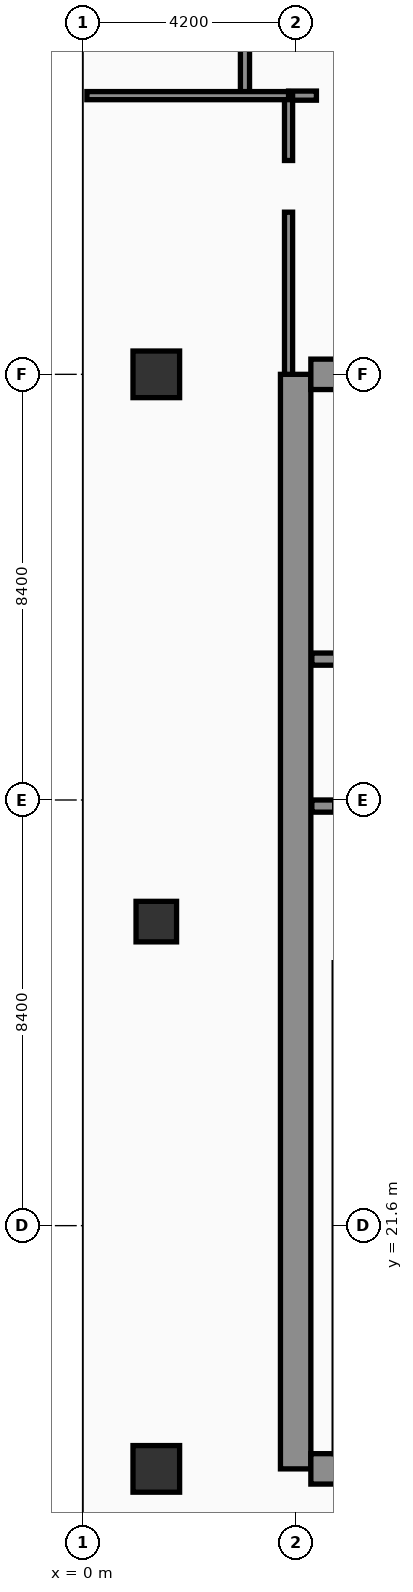
"""IFC4 building model, lengths in metres.
Left out: names, types, materials, properties, quantities, classifications, styles, units other than length and angle.
Written with IfcOpenShell. Run it as: python <this file> out.ifc"""

import sys

from ifc_helpers import new_model, si_unit, direction, frame, frame_2d, origin, origin_2d, place, context, subcontext, project, spatial, rectangle, extrude, element, fill, save


model = new_model("IFC4")
c1 = context("Model", 3, precision=1e-05, world=origin(), true_north=direction((0.0, 1.0)))
c2 = subcontext(c1, "Body", "Model", "MODEL_VIEW")
j1 = project(units=[si_unit("LENGTHUNIT", "METRE"), si_unit("PLANEANGLEUNIT", "RADIAN")], contexts=[c1])
p1 = place(None, origin())
s1 = spatial("IfcSite", under=j1, at=p1, CompositionType="ELEMENT")
p2 = place(p1, origin())
s2 = spatial("IfcBuilding", under=s1, at=p2, CompositionType="ELEMENT")
p3 = place(p2, frame((0.0, 0.0, 316.0)))
s3 = spatial("IfcBuildingStorey", under=s2, at=p3, CompositionType="ELEMENT", Elevation=316.0)
p4 = place(p3, frame((4.2, 16.8, 0.0), z_axis=(0.0, 0.0, 1.0), x_axis=(0.0, 1.0, 0.0)))
e1 = element("IfcWall", 1, at=p4, inside=s3, PredefinedType="SHEAR", context=c2, shape_type="SweptSolid", body=[
    extrude(rectangle(XDim=21.6, YDim=0.6, at=frame_2d((10.8, 0.0))), origin(), (0.0, 0.0, 1.0), 4.26),
])
p5 = place(p3, frame((4.5, 38.4, 0.0), z_axis=(0.0, 0.0, 1.0), x_axis=(1.0, 0.0, 0.0)))
e2 = element("IfcWall", 2, at=p5, inside=s3, PredefinedType="SHEAR", context=c2, shape_type="SweptSolid", body=[
    extrude(rectangle(XDim=10.2, YDim=0.6, at=frame_2d((5.1, 0.0))), origin(), (0.0, 0.0, 1.0), 4.26),
])
p6 = place(p5, frame((5.8, 0.0, 0.0)))
e3 = element("IfcOpeningElement", 3, at=p6, cuts=e2, PredefinedType="OPENING", context=c2, shape_type="SweptSolid", body=[
    extrude(rectangle(XDim=1.1, YDim=2.2, at=frame_2d((0.55, 1.1))), frame((0.0, 0.31, 0.0), z_axis=(0.0, -1.0, 0.0), x_axis=(1.0, 0.0, 0.0)), (0.0, 0.0, 1.0), 0.62),
])
p7 = place(p3, frame((4.5, 16.8, 0.0), z_axis=(0.0, 0.0, 1.0), x_axis=(1.0, 0.0, 0.0)))
e4 = element("IfcWall", 4, at=p7, inside=s3, PredefinedType="SHEAR", context=c2, shape_type="SweptSolid", body=[
    extrude(rectangle(XDim=10.2, YDim=0.6, at=frame_2d((5.1, 0.0))), origin(), (0.0, 0.0, 1.0), 4.26),
])
p8 = place(p3, frame((1.45, 16.8, 0.0), z_axis=(0.0, 0.0, 1.0), x_axis=(1.0, 0.0, 0.0)))
e5 = element("IfcColumn", 5, at=p8, inside=s3, PredefinedType="COLUMN", context=c2, shape_type="SweptSolid", body=[
    extrude(rectangle(XDim=0.92, YDim=0.92, at=origin_2d()), origin(), (0.0, 0.0, 1.0), 4.26),
])
p9 = place(p3, frame((1.45, 27.6, 0.0), z_axis=(0.0, 0.0, 1.0), x_axis=(1.0, 0.0, 0.0)))
e6 = element("IfcColumn", 6, at=p9, inside=s3, PredefinedType="COLUMN", context=c2, shape_type="SweptSolid", body=[
    extrude(rectangle(XDim=0.8, YDim=0.8, at=origin_2d()), origin(), (0.0, 0.0, 1.0), 4.26),
])
p10 = place(p3, frame((1.45, 38.4, 0.0), z_axis=(0.0, 0.0, 1.0), x_axis=(1.0, 0.0, 0.0)))
e7 = element("IfcColumn", 7, at=p10, inside=s3, PredefinedType="COLUMN", context=c2, shape_type="SweptSolid", body=[
    extrude(rectangle(XDim=0.92, YDim=0.92, at=origin_2d()), origin(), (0.0, 0.0, 1.0), 4.26),
])
p11 = place(p3, frame((4.52, 29.88, 0.0), z_axis=(0.0, 0.0, 1.0), x_axis=(1.0, 0.0, 0.0)))
e8 = element("IfcWall", 8, at=p11, inside=s3, PredefinedType="SOLIDWALL", context=c2, shape_type="SweptSolid", body=[
    extrude(rectangle(XDim=4.9, YDim=0.24, at=frame_2d((2.45, 0.0))), origin(), (0.0, 0.0, 1.0), 4.26),
])
p12 = place(p11, frame((0.45, 0.0, 0.0)))
e9 = element("IfcOpeningElement", 9, at=p12, cuts=e8, PredefinedType="OPENING", context=c2, shape_type="SweptSolid", body=[
    extrude(rectangle(XDim=1.3, YDim=2.35, at=frame_2d((0.65, 1.175))), frame((0.0, 0.13, 0.0), z_axis=(0.0, -1.0, 0.0), x_axis=(1.0, 0.0, 0.0)), (0.0, 0.0, 1.0), 0.26),
])
p13 = place(p3, frame((4.52, 32.78, 0.0), z_axis=(0.0, 0.0, 1.0), x_axis=(1.0, 0.0, 0.0)))
e10 = element("IfcWall", 10, at=p13, inside=s3, PredefinedType="SOLIDWALL", context=c2, shape_type="SweptSolid", body=[
    extrude(rectangle(XDim=4.9, YDim=0.24, at=frame_2d((2.45, 0.0))), origin(), (0.0, 0.0, 1.0), 3.89),
])
p14 = place(p3, frame((3.2, 43.9, 0.0), z_axis=(0.0, 0.0, 1.0), x_axis=(0.0, 1.0, 0.0)))
e11 = element("IfcWall", 11, at=p14, inside=s3, PredefinedType="PARTITIONING", context=c2, shape_type="SweptSolid", body=[
    extrude(rectangle(XDim=3.9, YDim=0.18, at=frame_2d((1.95, 0.0))), origin(), (0.0, 0.0, 1.0), 4.26),
])
p15 = place(p3, frame((4.06, 43.9, 0.0), z_axis=(0.0, 0.0, 1.0), x_axis=(1.0, 0.0, 0.0)))
e12 = element("IfcWall", 12, at=p15, inside=s3, PredefinedType="PARTITIONING", context=c2, shape_type="SweptSolid", body=[
    extrude(rectangle(XDim=10.74, YDim=0.18, at=frame_2d((5.37, 0.0))), origin(), (0.0, 0.0, 1.0), 3.69),
])
p16 = place(p15, frame((0.55, 0.0, 0.0)))
e13 = element("IfcOpeningElement", 13, at=p16, cuts=e12, PredefinedType="OPENING", context=c2, shape_type="SweptSolid", body=[
    extrude(rectangle(XDim=1.02, YDim=2.2, at=frame_2d((0.51, 1.1))), frame((0.0, 0.1, 0.0), z_axis=(0.0, -1.0, 0.0), x_axis=(1.0, 0.0, 0.0)), (0.0, 0.0, 1.0), 0.2),
])
p17 = place(p15, frame((4.65, 0.0, 0.0)))
e14 = element("IfcOpeningElement", 14, at=p17, cuts=e12, PredefinedType="OPENING", context=c2, shape_type="SweptSolid", body=[
    extrude(rectangle(XDim=1.02, YDim=2.2, at=frame_2d((0.51, 1.1))), frame((0.0, 0.1, 0.0), z_axis=(0.0, -1.0, 0.0), x_axis=(1.0, 0.0, 0.0)), (0.0, 0.0, 1.0), 0.2),
])
p18 = place(p15, frame((8.4, 0.0, 0.0)))
e15 = element("IfcOpeningElement", 15, at=p18, cuts=e12, PredefinedType="OPENING", context=c2, shape_type="SweptSolid", body=[
    extrude(rectangle(XDim=1.02, YDim=2.2, at=frame_2d((0.51, 1.1))), frame((0.0, 0.1, 0.0), z_axis=(0.0, -1.0, 0.0), x_axis=(1.0, 0.0, 0.0)), (0.0, 0.0, 1.0), 0.2),
])
p19 = place(p3, frame((4.06, 38.4, 0.0), z_axis=(0.0, 0.0, 1.0), x_axis=(0.0, 1.0, 0.0)))
e16 = element("IfcWall", 16, at=p19, inside=s3, PredefinedType="PARTITIONING", context=c2, shape_type="SweptSolid", body=[
    extrude(rectangle(XDim=5.5, YDim=0.16, at=frame_2d((2.75, 0.0))), origin(), (0.0, 0.0, 1.0), 3.69),
])
p20 = place(p19, frame((3.2, 0.0, 0.0)))
e17 = element("IfcOpeningElement", 17, at=p20, cuts=e16, PredefinedType="OPENING", context=c2, shape_type="SweptSolid", body=[
    extrude(rectangle(XDim=1.02, YDim=2.2, at=frame_2d((0.51, 1.1))), frame((0.0, 0.09, 0.0), z_axis=(0.0, -1.0, 0.0), x_axis=(1.0, 0.0, 0.0)), (0.0, 0.0, 1.0), 0.18),
])
p21 = place(p3, frame((0.08, 43.9, 0.0), z_axis=(0.0, 0.0, 1.0), x_axis=(1.0, 0.0, 0.0)))
e18 = element("IfcWall", 18, at=p21, inside=s3, PredefinedType="PARTITIONING", context=c2, shape_type="SweptSolid", body=[
    extrude(rectangle(XDim=3.98, YDim=0.16, at=frame_2d((1.99, 0.0))), origin(), (0.0, 0.0, 1.0), 3.69),
])
p22 = place(p16, origin())
e19 = element("IfcDoor", 19, at=p22, inside=s3, OperationType="SINGLE_SWING_LEFT", PredefinedType="DOOR", context=c2, shape_type="SweptSolid", body=[
    extrude(rectangle(XDim=1.02, YDim=2.2, at=frame_2d((0.51, 1.1))), frame((0.0, 0.025, 0.0), z_axis=(0.0, -1.0, 0.0), x_axis=(1.0, 0.0, 0.0)), (0.0, 0.0, 1.0), 0.05),
])
fill(e13, e19)
p23 = place(p20, origin())
e20 = element("IfcDoor", 20, at=p23, inside=s3, OperationType="SINGLE_SWING_LEFT", PredefinedType="DOOR", context=c2, shape_type="SweptSolid", body=[
    extrude(rectangle(XDim=1.02, YDim=2.2, at=frame_2d((0.51, 1.1))), frame((0.0, 0.025, 0.0), z_axis=(0.0, -1.0, 0.0), x_axis=(1.0, 0.0, 0.0)), (0.0, 0.0, 1.0), 0.05),
])
fill(e17, e20)
save(model, sys.argv[1])
